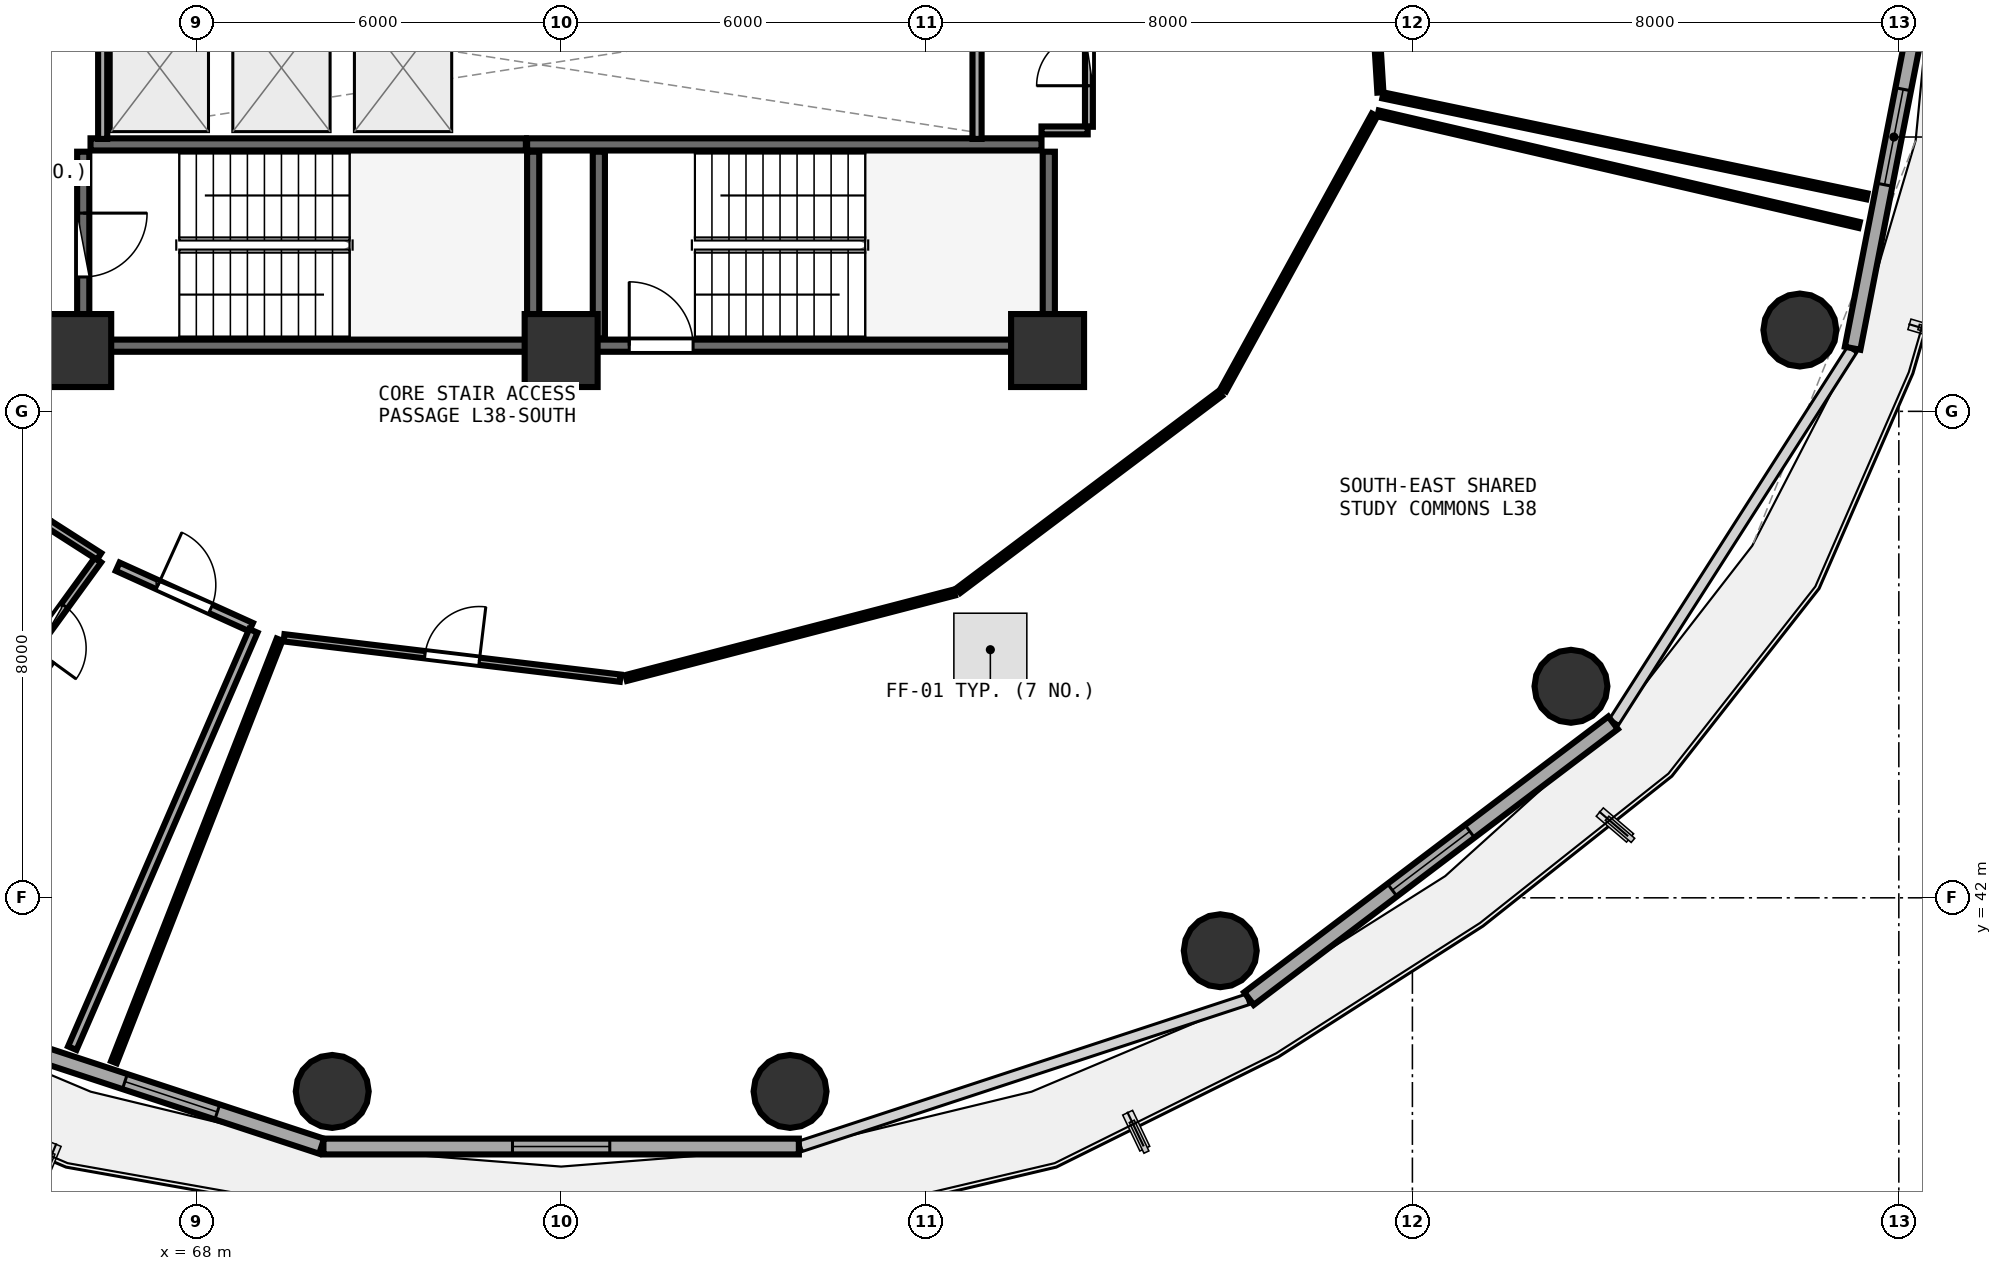
"""IFC4 building model, lengths in metres.
Left out: names, types, materials, properties, quantities, classifications, styles, units other than length and angle.
Written with IfcOpenShell. Run it as: python <this file> out.ifc"""

import sys

from ifc_helpers import new_model, si_unit, direction, frame, frame_2d, origin, origin_2d, place, context, subcontext, project, spatial, rectangle, circle, extrude, element, fill, save


model = new_model("IFC4")
c1 = context("Model", 3, precision=1e-05, world=origin(), true_north=direction((0.0, 1.0)))
c2 = subcontext(c1, "Body", "Model", "MODEL_VIEW")
j1 = project(units=[si_unit("LENGTHUNIT", "METRE"), si_unit("PLANEANGLEUNIT", "RADIAN")], contexts=[c1])
p1 = place(None, origin())
s1 = spatial("IfcSite", under=j1, at=p1, CompositionType="ELEMENT")
p2 = place(p1, origin())
s2 = spatial("IfcBuilding", under=s1, at=p2, CompositionType="ELEMENT")
p3 = place(p2, frame((0.0, 0.0, 150.6)))
s3 = spatial("IfcBuildingStorey", under=s2, at=p3, CompositionType="ELEMENT", Elevation=150.6)
for number, where, z_axis, x_axis in (
    (1, (66.0, 51.0, 0.0), (0.0, 0.0, 1.0), (1.0, 0.0, 0.0)),
    (2, (74.0, 51.0, 0.0), (0.0, 0.0, 1.0), (1.0, 0.0, 0.0)),
    (3, (82.0, 51.0, 0.0), (0.0, 0.0, 1.0), (1.0, 0.0, 0.0)),
):
    element("IfcColumn", number, at=place(p3, frame(where, z_axis=z_axis, x_axis=x_axis)), inside=s3, PredefinedType="PILASTER", context=c2, shape_type="SweptSolid", body=[
        extrude(rectangle(XDim=1.2, YDim=1.2, at=origin_2d()), origin(), (0.0, 0.0, 1.0), 3.75),
    ])
for number, where, z_axis, x_axis in (
    (4, (70.235, 38.816, 0.0), (0.0, 0.0, 1.0), (1.0, 0.0, 0.0)),
    (5, (77.765, 38.816, 0.0), (0.0, 0.0, 1.0), (1.0, 0.0, 0.0)),
    (6, (84.84, 41.13, 0.0), (0.0, 0.0, 1.0), (1.0, 0.0, 0.0)),
    (7, (90.608, 45.479, 0.0), (0.0, 0.0, 1.0), (1.0, 0.0, 0.0)),
    (8, (94.373, 51.337, 0.0), (0.0, 0.0, 1.0), (1.0, 0.0, 0.0)),
):
    element("IfcColumn", number, at=place(p3, frame(where, z_axis=z_axis, x_axis=x_axis)), inside=s3, PredefinedType="COLUMN", context=c2, shape_type="SweptSolid", body=[
        extrude(circle(Radius=0.6, at=origin_2d()), origin(), (0.0, 0.0, 1.0), 3.75),
    ])
p4 = place(p3, frame((62.714, 40.328, 0.0), z_axis=(0.0, 0.0, 1.0), x_axis=(0.950038302428, -0.312133343173, 0.0)))
e9 = element("IfcWall", 9, at=p4, inside=s3, PredefinedType="SOLIDWALL", context=c2, shape_type="SweptSolid", body=[
    extrude(rectangle(XDim=7.733, YDim=0.26, at=frame_2d((3.867, 0.0))), origin(), (0.0, 0.0, 1.0), 3.475),
])
p5 = place(p4, frame((4.327, 0.0, 0.85)))
e10 = element("IfcOpeningElement", 10, at=p5, cuts=e9, PredefinedType="OPENING", context=c2, shape_type="SweptSolid", body=[
    extrude(rectangle(XDim=1.6, YDim=1.45, at=frame_2d((0.8, 0.725))), frame((0.0, 0.14, 0.0), z_axis=(0.0, -1.0, 0.0), x_axis=(1.0, 0.0, 0.0)), (0.0, 0.0, 1.0), 0.28),
])
p6 = place(p3, frame((70.091, 37.91, 0.0), z_axis=(0.0, 0.0, 1.0), x_axis=(1.0, 0.0, 0.0)))
e11 = element("IfcWall", 11, at=p6, inside=s3, PredefinedType="SOLIDWALL", context=c2, shape_type="SweptSolid", body=[
    extrude(rectangle(XDim=7.819, YDim=0.26, at=frame_2d((3.909, 0.0))), origin(), (0.0, 0.0, 1.0), 3.475),
])
p7 = place(p6, frame((3.109, 0.0, 0.85)))
e12 = element("IfcOpeningElement", 12, at=p7, cuts=e11, PredefinedType="OPENING", context=c2, shape_type="SweptSolid", body=[
    extrude(rectangle(XDim=1.6, YDim=1.45, at=frame_2d((0.8, 0.725))), frame((0.0, 0.14, 0.0), z_axis=(0.0, -1.0, 0.0), x_axis=(1.0, 0.0, 0.0)), (0.0, 0.0, 1.0), 0.28),
])
p8 = place(p3, frame((85.312, 40.342, 0.0), z_axis=(0.0, 0.0, 1.0), x_axis=(0.797163719609, 0.603763202042, 0.0)))
e13 = element("IfcWall", 13, at=p8, inside=s3, PredefinedType="SOLIDWALL", context=c2, shape_type="SweptSolid", body=[
    extrude(rectangle(XDim=7.512, YDim=0.26, at=frame_2d((3.756, 0.0))), origin(), (0.0, 0.0, 1.0), 3.475),
])
p9 = place(p8, frame((2.956, 0.0, 0.85)))
e14 = element("IfcOpeningElement", 14, at=p9, cuts=e13, PredefinedType="OPENING", context=c2, shape_type="SweptSolid", body=[
    extrude(rectangle(XDim=1.6, YDim=1.45, at=frame_2d((0.8, 0.725))), frame((0.0, 0.14, 0.0), z_axis=(0.0, -1.0, 0.0), x_axis=(1.0, 0.0, 0.0)), (0.0, 0.0, 1.0), 0.28),
])
p10 = place(p3, frame((95.24, 51.038, 0.0), z_axis=(0.0, 0.0, 1.0), x_axis=(0.191716984769, 0.981450252306, 0.0)))
e15 = element("IfcWall", 15, at=p10, inside=s3, PredefinedType="SOLIDWALL", context=c2, shape_type="SweptSolid", body=[
    extrude(rectangle(XDim=7.079, YDim=0.26, at=frame_2d((3.54, 0.0))), origin(), (0.0, 0.0, 1.0), 3.475),
])
p11 = place(p10, frame((2.74, 0.0, 0.85)))
e16 = element("IfcOpeningElement", 16, at=p11, cuts=e15, PredefinedType="OPENING", context=c2, shape_type="SweptSolid", body=[
    extrude(rectangle(XDim=1.6, YDim=1.45, at=frame_2d((0.8, 0.725))), frame((0.0, 0.14, 0.0), z_axis=(0.0, -1.0, 0.0), x_axis=(1.0, 0.0, 0.0)), (0.0, 0.0, 1.0), 0.28),
])
p12 = place(p3, frame((74.0, 51.08, 0.0), z_axis=(0.0, 0.0, 1.0), x_axis=(1.0, 0.0, 0.0)))
e17 = element("IfcWall", 17, at=p12, inside=s3, PredefinedType="SHEAR", context=c2, shape_type="SweptSolid", body=[
    extrude(rectangle(XDim=7.9, YDim=0.2, at=frame_2d((3.95, 0.0))), origin(), (0.0, 0.0, 1.0), 3.49),
])
p13 = place(p12, frame((1.12, 0.0, 0.0)))
e18 = element("IfcOpeningElement", 18, at=p13, cuts=e17, PredefinedType="OPENING", context=c2, shape_type="SweptSolid", body=[
    extrude(rectangle(XDim=1.05, YDim=2.1, at=frame_2d((0.525, 1.05))), frame((0.0, 0.11, 0.0), z_axis=(0.0, -1.0, 0.0), x_axis=(1.0, 0.0, 0.0)), (0.0, 0.0, 1.0), 0.22),
])
p14 = place(p3, frame((82.02, 51.2, 0.0), z_axis=(0.0, 0.0, 1.0), x_axis=(0.0, 1.0, 0.0)))
e19 = element("IfcWall", 19, at=p14, inside=s3, PredefinedType="SHEAR", context=c2, shape_type="SweptSolid", body=[
    extrude(rectangle(XDim=3.07, YDim=0.2, at=frame_2d((1.535, 0.0))), origin(), (0.0, 0.0, 1.0), 3.49),
])
p15 = place(p3, frame((81.9, 54.39, 0.0), z_axis=(0.0, 0.0, 1.0), x_axis=(-1.0, 0.0, 0.0)))
e20 = element("IfcWall", 20, at=p15, inside=s3, PredefinedType="SHEAR", context=c2, shape_type="SweptSolid", body=[
    extrude(rectangle(XDim=8.46, YDim=0.2, at=frame_2d((4.23, 0.0))), origin(), (0.0, 0.0, 1.0), 3.49),
])
p16 = place(p3, frame((74.62, 54.27, 0.0), z_axis=(0.0, 0.0, 1.0), x_axis=(0.0, -1.0, 0.0)))
e21 = element("IfcWall", 21, at=p16, inside=s3, PredefinedType="SHEAR", context=c2, shape_type="SweptSolid", body=[
    extrude(rectangle(XDim=3.07, YDim=0.2, at=frame_2d((1.535, 0.0))), origin(), (0.0, 0.0, 1.0), 3.49),
])
p17 = place(p3, frame((66.26, 51.08, 0.0), z_axis=(0.0, 0.0, 1.0), x_axis=(1.0, 0.0, 0.0)))
e22 = element("IfcWall", 22, at=p17, inside=s3, PredefinedType="SHEAR", context=c2, shape_type="SweptSolid", body=[
    extrude(rectangle(XDim=7.16, YDim=0.2, at=frame_2d((3.58, 0.0))), origin(), (0.0, 0.0, 1.0), 3.49),
])
p18 = place(p3, frame((73.54, 51.2, 0.0), z_axis=(0.0, 0.0, 1.0), x_axis=(0.0, 1.0, 0.0)))
e23 = element("IfcWall", 23, at=p18, inside=s3, PredefinedType="SHEAR", context=c2, shape_type="SweptSolid", body=[
    extrude(rectangle(XDim=3.07, YDim=0.2, at=frame_2d((1.535, 0.0))), origin(), (0.0, 0.0, 1.0), 3.49),
])
p19 = place(p3, frame((73.42, 54.39, 0.0), z_axis=(0.0, 0.0, 1.0), x_axis=(-1.0, 0.0, 0.0)))
e24 = element("IfcWall", 24, at=p19, inside=s3, PredefinedType="SHEAR", context=c2, shape_type="SweptSolid", body=[
    extrude(rectangle(XDim=7.16, YDim=0.2, at=frame_2d((3.58, 0.0))), origin(), (0.0, 0.0, 1.0), 3.49),
])
p20 = place(p3, frame((66.14, 54.27, 0.0), z_axis=(0.0, 0.0, 1.0), x_axis=(0.0, -1.0, 0.0)))
e25 = element("IfcWall", 25, at=p20, inside=s3, PredefinedType="SHEAR", context=c2, shape_type="SweptSolid", body=[
    extrude(rectangle(XDim=3.07, YDim=0.2, at=frame_2d((1.535, 0.0))), origin(), (0.0, 0.0, 1.0), 3.49),
])
p21 = place(p20, frame((1.01, 0.0, 0.0)))
e26 = element("IfcOpeningElement", 26, at=p21, cuts=e25, PredefinedType="OPENING", context=c2, shape_type="SweptSolid", body=[
    extrude(rectangle(XDim=1.05, YDim=2.1, at=frame_2d((0.525, 1.05))), frame((0.0, 0.11, 0.0), z_axis=(0.0, -1.0, 0.0), x_axis=(1.0, 0.0, 0.0)), (0.0, 0.0, 1.0), 0.22),
])
for number, where, z_axis, x_axis in (
    (27, (66.46, 54.48, 0.0), (0.0, 0.0, 1.0), (0.0, 1.0, 0.0)),
    (28, (80.84, 54.48, 0.0), (0.0, 0.0, 1.0), (0.0, 1.0, 0.0)),
):
    element("IfcWall", number, at=place(p3, frame(where, z_axis=z_axis, x_axis=x_axis)), inside=s3, PredefinedType="PARTITIONING", context=c2, shape_type="SweptSolid", body=[
        extrude(rectangle(XDim=2.29, YDim=0.15, at=frame_2d((1.145, 0.0))), origin(), (0.0, 0.0, 1.0), 3.48),
    ])
p22 = place(p3, frame((82.68, 54.68, 0.0), z_axis=(0.0, 0.0, 1.0), x_axis=(0.0, 1.0, 0.0)))
e29 = element("IfcWall", 29, at=p22, inside=s3, PredefinedType="PLUMBINGWALL", context=c2, shape_type="SweptSolid", body=[
    extrude(rectangle(XDim=2.21, YDim=0.13, at=frame_2d((1.105, 0.0))), origin(), (0.0, 0.0, 1.0), 3.48),
])
p23 = place(p22, frame((0.675, 0.0, 0.0)))
e30 = element("IfcOpeningElement", 30, at=p23, cuts=e29, PredefinedType="OPENING", context=c2, shape_type="SweptSolid", body=[
    extrude(rectangle(XDim=0.86, YDim=2.05, at=frame_2d((0.43, 1.025))), frame((0.0, 0.075, 0.0), z_axis=(0.0, -1.0, 0.0), x_axis=(1.0, 0.0, 0.0)), (0.0, 0.0, 1.0), 0.15),
])
p24 = place(p3, frame((69.443, 46.276, 0.0), z_axis=(0.0, 0.0, 1.0), x_axis=(0.992874348748, -0.119165966612, 0.0)))
e31 = element("IfcWall", 31, at=p24, inside=s3, PredefinedType="PARTITIONING", context=c2, shape_type="SweptSolid", body=[
    extrude(rectangle(XDim=5.569, YDim=0.12, at=frame_2d((2.784, 0.0))), origin(), (0.0, 0.0, 1.0), 2.975),
])
p25 = place(p24, frame((2.334, 0.0, 0.0)))
e32 = element("IfcOpeningElement", 32, at=p25, cuts=e31, PredefinedType="OPENING", context=c2, shape_type="SweptSolid", body=[
    extrude(rectangle(XDim=0.9, YDim=2.08, at=frame_2d((0.45, 1.04))), frame((0.0, 0.07, 0.0), z_axis=(0.0, -1.0, 0.0), x_axis=(1.0, 0.0, 0.0)), (0.0, 0.0, 1.0), 0.14),
])
p26 = place(p3, frame((66.383, 47.555, 0.0), z_axis=(0.0, 0.0, 1.0), x_axis=(-0.588001344837, -0.808859949849, 0.0)))
e33 = element("IfcWall", 33, at=p26, inside=s3, PredefinedType="PLUMBINGWALL", context=c2, shape_type="SweptSolid", body=[
    extrude(rectangle(XDim=2.727, YDim=0.13, at=frame_2d((1.364, 0.0))), origin(), (0.0, 0.0, 1.0), 3.235),
])
p27 = place(p26, frame((0.934, 0.0, 0.0)))
e34 = element("IfcOpeningElement", 34, at=p27, cuts=e33, PredefinedType="OPENING", context=c2, shape_type="SweptSolid", body=[
    extrude(rectangle(XDim=0.86, YDim=2.05, at=frame_2d((0.43, 1.025))), frame((0.0, 0.075, 0.0), z_axis=(0.0, -1.0, 0.0), x_axis=(1.0, 0.0, 0.0)), (0.0, 0.0, 1.0), 0.15),
])
p28 = place(p3, frame((66.707, 47.445, 0.0), z_axis=(0.0, 0.0, 1.0), x_axis=(0.910872904928, -0.412686989216, 0.0)))
e35 = element("IfcWall", 35, at=p28, inside=s3, PredefinedType="PARTITIONING", context=c2, shape_type="SweptSolid", body=[
    extrude(rectangle(XDim=2.407, YDim=0.15, at=frame_2d((1.204, 0.0))), origin(), (0.0, 0.0, 1.0), 3.235),
])
p29 = place(p28, frame((0.729, 0.0, 0.0)))
e36 = element("IfcOpeningElement", 36, at=p29, cuts=e35, PredefinedType="OPENING", context=c2, shape_type="SweptSolid", body=[
    extrude(rectangle(XDim=0.95, YDim=2.08, at=frame_2d((0.475, 1.04))), frame((0.0, 0.085, 0.0), z_axis=(0.0, -1.0, 0.0), x_axis=(1.0, 0.0, 0.0)), (0.0, 0.0, 1.0), 0.17),
])
p30 = place(p3, frame((81.9, 54.62, 0.0), z_axis=(0.0, 0.0, 1.0), x_axis=(1.0, 0.0, 0.0)))
e37 = element("IfcWall", 37, at=p30, inside=s3, PredefinedType="PLUMBINGWALL", context=c2, shape_type="SweptSolid", body=[
    extrude(rectangle(XDim=0.76, YDim=0.13, at=frame_2d((0.38, 0.0))), origin(), (0.0, 0.0, 1.0), 2.775),
])
p31 = place(p3, frame((75.07, 45.615, 0.0), z_axis=(0.0, 0.0, 1.0), x_axis=(0.967718115259, 0.252035016216, 0.0)))
e38 = element("IfcWall", 38, at=p31, inside=s3, PredefinedType="PARTITIONING", context=c2, shape_type="SweptSolid", body=[
    extrude(rectangle(XDim=5.575, YDim=0.1, at=frame_2d((2.787, 0.0))), origin(), (0.0, 0.0, 1.0), 2.975),
])
p32 = place(p3, frame((80.535, 47.054, 0.0), z_axis=(0.0, 0.0, 1.0), x_axis=(0.799096406603, 0.601202904979, 0.0)))
e39 = element("IfcWall", 39, at=p32, inside=s3, PredefinedType="PARTITIONING", context=c2, shape_type="SweptSolid", body=[
    extrude(rectangle(XDim=5.387, YDim=0.1, at=frame_2d((2.694, 0.0))), origin(), (0.0, 0.0, 1.0), 2.975),
])
p33 = place(p3, frame((84.891, 50.352, 0.0), z_axis=(0.0, 0.0, 1.0), x_axis=(0.481680787808, 0.876346745676, 0.0)))
e40 = element("IfcWall", 40, at=p33, inside=s3, PredefinedType="PARTITIONING", context=c2, shape_type="SweptSolid", body=[
    extrude(rectangle(XDim=5.16, YDim=0.1, at=frame_2d((2.58, 0.0))), origin(), (0.0, 0.0, 1.0), 2.975),
])
p34 = place(p3, frame((87.435, 54.9, 0.0), z_axis=(0.0, 0.0, 1.0), x_axis=(0.97414388338, -0.225928516292, 0.0)))
e41 = element("IfcWall", 41, at=p34, inside=s3, PredefinedType="PARTITIONING", context=c2, shape_type="SweptSolid", body=[
    extrude(rectangle(XDim=8.122, YDim=0.1, at=frame_2d((4.061, 0.0))), origin(), (0.0, 0.0, 1.0), 3.025),
])
p35 = place(p3, frame((66.645, 39.297, 0.0), z_axis=(0.0, 0.0, 1.0), x_axis=(0.364957999702, 0.931023983823, 0.0)))
e42 = element("IfcWall", 42, at=p35, inside=s3, PredefinedType="PARTITIONING", context=c2, shape_type="SweptSolid", body=[
    extrude(rectangle(XDim=7.464, YDim=0.1, at=frame_2d((3.732, 0.0))), origin(), (0.0, 0.0, 1.0), 3.025),
])
p36 = place(p3, frame((87.474, 55.244, 0.0), z_axis=(0.0, 0.0, 1.0), x_axis=(-0.060688331813, 0.998156764432, 0.0)))
e43 = element("IfcWall", 43, at=p36, inside=s3, PredefinedType="PARTITIONING", context=c2, shape_type="SweptSolid", body=[
    extrude(rectangle(XDim=6.827, YDim=0.1, at=frame_2d((3.414, 0.0))), origin(), (0.0, 0.0, 1.0), 2.975),
])
p37 = place(p3, frame((95.475, 53.536, 0.0), z_axis=(0.0, 0.0, 1.0), x_axis=(-0.978946183013, 0.204118521367, 0.0)))
e44 = element("IfcWall", 44, at=p37, inside=s3, PredefinedType="PARTITIONING", context=c2, shape_type="SweptSolid", body=[
    extrude(rectangle(XDim=8.131, YDim=0.1, at=frame_2d((4.065, 0.0))), origin(), (0.0, 0.0, 1.0), 3.025),
])
p38 = place(p3, frame((65.573, 48.145, 0.0), z_axis=(0.0, 0.0, 1.0), x_axis=(0.842104586495, -0.539314254776, 0.0)))
e45 = element("IfcWall", 45, at=p38, inside=s3, PredefinedType="PLUMBINGWALL", context=c2, shape_type="SweptSolid", body=[
    extrude(rectangle(XDim=0.984, YDim=0.13, at=frame_2d((0.492, 0.0))), origin(), (0.0, 0.0, 1.0), 3.48),
])
p39 = place(p3, frame((68.938, 46.39, 0.0), z_axis=(0.0, 0.0, 1.0), x_axis=(-0.398074464123, -0.917353105959, 0.0)))
e46 = element("IfcWall", 46, at=p39, inside=s3, PredefinedType="PARTITIONING", context=c2, shape_type="SweptSolid", body=[
    extrude(rectangle(XDim=7.481, YDim=0.15, at=frame_2d((3.741, 0.0))), origin(), (0.0, 0.0, 1.0), 3.025),
])
p40 = place(p5, origin())
e47 = element("IfcWindow", 47, at=p40, inside=s3, PartitioningType="SINGLE_PANEL", PredefinedType="WINDOW", context=c2, shape_type="SweptSolid", body=[
    extrude(rectangle(XDim=1.6, YDim=1.45, at=frame_2d((0.8, 0.725))), frame((0.0, 0.03, 0.0), z_axis=(0.0, -1.0, 0.0), x_axis=(1.0, 0.0, 0.0)), (0.0, 0.0, 1.0), 0.06),
])
fill(e10, e47)
p41 = place(p7, origin())
e48 = element("IfcWindow", 48, at=p41, inside=s3, PartitioningType="SINGLE_PANEL", PredefinedType="WINDOW", context=c2, shape_type="SweptSolid", body=[
    extrude(rectangle(XDim=1.6, YDim=1.45, at=frame_2d((0.8, 0.725))), frame((0.0, 0.03, 0.0), z_axis=(0.0, -1.0, 0.0), x_axis=(1.0, 0.0, 0.0)), (0.0, 0.0, 1.0), 0.06),
])
fill(e12, e48)
p42 = place(p9, origin())
e49 = element("IfcWindow", 49, at=p42, inside=s3, PartitioningType="SINGLE_PANEL", PredefinedType="WINDOW", context=c2, shape_type="SweptSolid", body=[
    extrude(rectangle(XDim=1.6, YDim=1.45, at=frame_2d((0.8, 0.725))), frame((0.0, 0.03, 0.0), z_axis=(0.0, -1.0, 0.0), x_axis=(1.0, 0.0, 0.0)), (0.0, 0.0, 1.0), 0.06),
])
fill(e14, e49)
p43 = place(p11, origin())
e50 = element("IfcWindow", 50, at=p43, inside=s3, PartitioningType="SINGLE_PANEL", PredefinedType="WINDOW", context=c2, shape_type="SweptSolid", body=[
    extrude(rectangle(XDim=1.6, YDim=1.45, at=frame_2d((0.8, 0.725))), frame((0.0, 0.03, 0.0), z_axis=(0.0, -1.0, 0.0), x_axis=(1.0, 0.0, 0.0)), (0.0, 0.0, 1.0), 0.06),
])
fill(e16, e50)
p44 = place(p13, origin())
e51 = element("IfcDoor", 51, at=p44, inside=s3, OperationType="SINGLE_SWING_LEFT", PredefinedType="DOOR", context=c2, shape_type="SweptSolid", body=[
    extrude(rectangle(XDim=1.05, YDim=2.1, at=frame_2d((0.525, 1.05))), frame((0.0, 0.025, 0.0), z_axis=(0.0, -1.0, 0.0), x_axis=(1.0, 0.0, 0.0)), (0.0, 0.0, 1.0), 0.05),
])
fill(e18, e51)
p45 = place(p21, origin())
e52 = element("IfcDoor", 52, at=p45, inside=s3, OperationType="SINGLE_SWING_LEFT", PredefinedType="DOOR", context=c2, shape_type="SweptSolid", body=[
    extrude(rectangle(XDim=1.05, YDim=2.1, at=frame_2d((0.525, 1.05))), frame((0.0, 0.025, 0.0), z_axis=(0.0, -1.0, 0.0), x_axis=(1.0, 0.0, 0.0)), (0.0, 0.0, 1.0), 0.05),
])
fill(e26, e52)
p46 = place(p23, origin())
e53 = element("IfcDoor", 53, at=p46, inside=s3, OperationType="SINGLE_SWING_LEFT", PredefinedType="DOOR", context=c2, shape_type="SweptSolid", body=[
    extrude(rectangle(XDim=0.86, YDim=2.05, at=frame_2d((0.43, 1.025))), frame((0.0, 0.025, 0.0), z_axis=(0.0, -1.0, 0.0), x_axis=(1.0, 0.0, 0.0)), (0.0, 0.0, 1.0), 0.05),
])
fill(e30, e53)
p47 = place(p25, origin())
e54 = element("IfcDoor", 54, at=p47, inside=s3, OperationType="SINGLE_SWING_RIGHT", PredefinedType="DOOR", context=c2, shape_type="SweptSolid", body=[
    extrude(rectangle(XDim=0.9, YDim=2.08, at=frame_2d((0.45, 1.04))), frame((0.0, 0.025, 0.0), z_axis=(0.0, -1.0, 0.0), x_axis=(1.0, 0.0, 0.0)), (0.0, 0.0, 1.0), 0.05),
])
fill(e32, e54)
p48 = place(p27, origin())
e55 = element("IfcDoor", 55, at=p48, inside=s3, OperationType="SINGLE_SWING_RIGHT", PredefinedType="DOOR", context=c2, shape_type="SweptSolid", body=[
    extrude(rectangle(XDim=0.86, YDim=2.05, at=frame_2d((0.43, 1.025))), frame((0.0, 0.025, 0.0), z_axis=(0.0, -1.0, 0.0), x_axis=(1.0, 0.0, 0.0)), (0.0, 0.0, 1.0), 0.05),
])
fill(e34, e55)
p49 = place(p29, origin())
e56 = element("IfcDoor", 56, at=p49, inside=s3, OperationType="SINGLE_SWING_LEFT", PredefinedType="DOOR", context=c2, shape_type="SweptSolid", body=[
    extrude(rectangle(XDim=0.95, YDim=2.08, at=frame_2d((0.475, 1.04))), frame((0.0, 0.025, 0.0), z_axis=(0.0, -1.0, 0.0), x_axis=(1.0, 0.0, 0.0)), (0.0, 0.0, 1.0), 0.05),
])
fill(e36, e56)
save(model, sys.argv[1])
